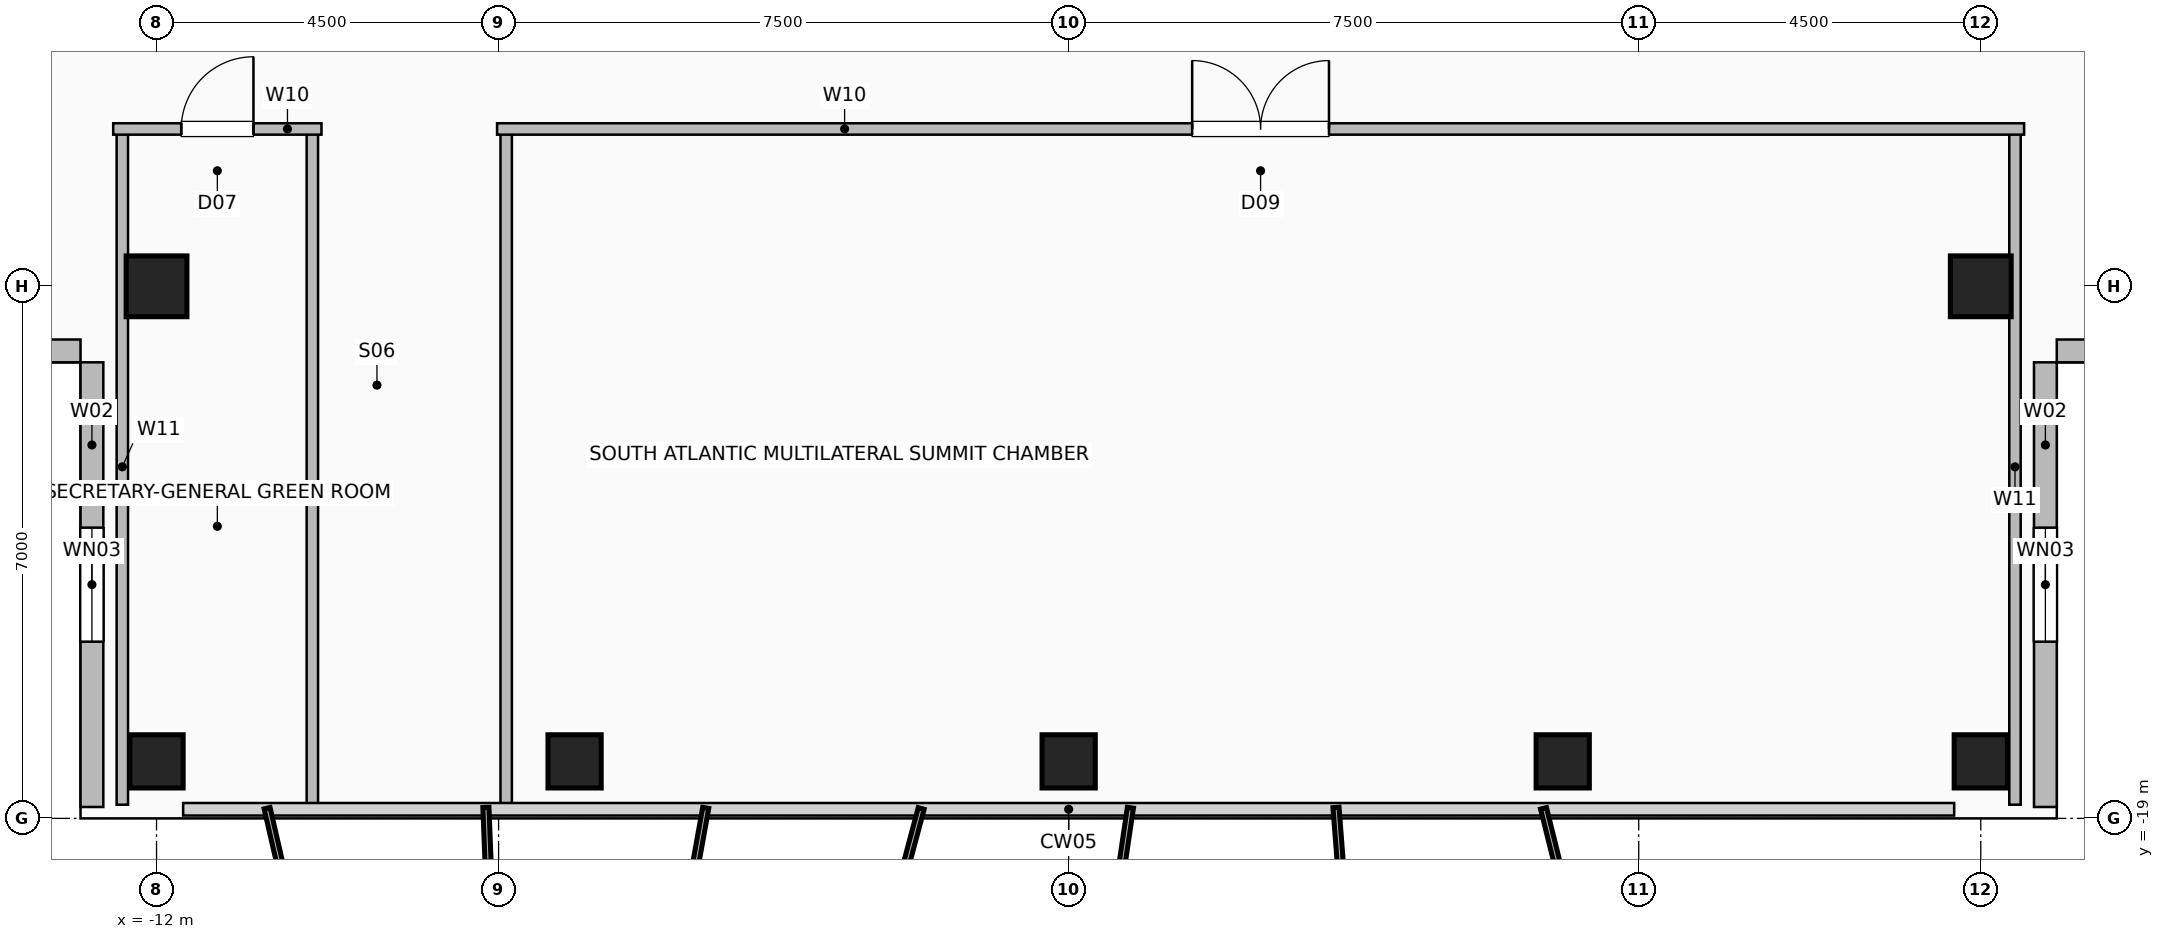
"""IFC4 building model, lengths in metres.
Left out: names, types, materials, properties, quantities, classifications, styles, units other than length and angle.
Written with IfcOpenShell. Run it as: python <this file> out.ifc"""

import sys

from ifc_helpers import new_model, si_unit, direction, frame, frame_2d, origin, origin_2d, place, context, subcontext, project, spatial, rectangle, hollow_rectangle, extrude, element, fill, save


model = new_model("IFC4")
c1 = context("Model", 3, precision=1e-05, world=origin(), true_north=direction((0.0, 1.0)))
c2 = subcontext(c1, "Body", "Model", "MODEL_VIEW")
j1 = project(units=[si_unit("LENGTHUNIT", "METRE"), si_unit("PLANEANGLEUNIT", "RADIAN")], contexts=[c1])
p1 = place(None, origin())
s1 = spatial("IfcSite", under=j1, at=p1, CompositionType="ELEMENT")
p2 = place(p1, origin())
s2 = spatial("IfcBuilding", under=s1, at=p2, CompositionType="ELEMENT")
p3 = place(p2, frame((0.0, 0.0, 250.4)))
s3 = spatial("IfcBuildingStorey", under=s2, at=p3, CompositionType="ELEMENT", Elevation=250.4)
for number, where, z_axis, x_axis in (
    (1, (-12.0, -18.25, 0.0), (0.0, 0.0, 1.0), (1.0, 0.0, 0.0)),
    (2, (-6.5, -18.25, 0.0), (0.0, 0.0, 1.0), (1.0, 0.0, 0.0)),
    (3, (0.0, -18.25, 0.0), (0.0, 0.0, 1.0), (1.0, 0.0, 0.0)),
    (4, (6.5, -18.25, 0.0), (0.0, 0.0, 1.0), (1.0, 0.0, 0.0)),
    (5, (12.0, -18.25, 0.0), (0.0, 0.0, 1.0), (1.0, 0.0, 0.0)),
):
    element("IfcColumn", number, at=place(p3, frame(where, z_axis=z_axis, x_axis=x_axis)), inside=s3, PredefinedType="COLUMN", context=c2, shape_type="SweptSolid", body=[
        extrude(hollow_rectangle(XDim=0.7, YDim=0.7, WallThickness=0.035, at=origin_2d()), origin(), (0.0, 0.0, 1.0), 3.6),
    ])
for number, where, z_axis, x_axis in (
    (6, (-12.0, -12.0, 0.0), (0.0, 0.0, 1.0), (1.0, 0.0, 0.0)),
    (7, (12.0, -12.0, 0.0), (0.0, 0.0, 1.0), (1.0, 0.0, 0.0)),
):
    element("IfcColumn", number, at=place(p3, frame(where, z_axis=z_axis, x_axis=x_axis)), inside=s3, PredefinedType="COLUMN", context=c2, shape_type="SweptSolid", body=[
        extrude(hollow_rectangle(XDim=0.8, YDim=0.8, WallThickness=0.04, at=origin_2d()), origin(), (0.0, 0.0, 1.0), 3.6),
    ])
p4 = place(p3, frame((-12.85, -18.85, 0.0), z_axis=(0.0, 0.0, 1.0), x_axis=(0.0, 1.0, 0.0)))
e8 = element("IfcWall", 8, at=p4, inside=s3, PredefinedType="SOLIDWALL", context=c2, shape_type="SweptSolid", body=[
    extrude(rectangle(XDim=5.85, YDim=0.3, at=frame_2d((2.925, 0.0))), origin(), (0.0, 0.0, 1.0), 3.36),
])
p5 = place(p4, frame((2.175, 0.0, 0.9)))
e9 = element("IfcOpeningElement", 9, at=p5, cuts=e8, PredefinedType="OPENING", context=c2, shape_type="SweptSolid", body=[
    extrude(rectangle(XDim=1.5, YDim=1.8, at=frame_2d((0.75, 0.9))), frame((0.0, 0.16, 0.0), z_axis=(0.0, -1.0, 0.0), x_axis=(1.0, 0.0, 0.0)), (0.0, 0.0, 1.0), 0.32),
])
p6 = place(p3, frame((-18.85, -12.85, 0.0), z_axis=(0.0, 0.0, 1.0), x_axis=(1.0, 0.0, 0.0)))
e10 = element("IfcWall", 10, at=p6, inside=s3, PredefinedType="SOLIDWALL", context=c2, shape_type="SweptSolid", body=[
    extrude(rectangle(XDim=5.85, YDim=0.3, at=frame_2d((2.925, 0.0))), origin(), (0.0, 0.0, 1.0), 3.36),
])
p7 = place(p3, frame((12.85, -18.85, 0.0), z_axis=(0.0, 0.0, 1.0), x_axis=(0.0, 1.0, 0.0)))
e11 = element("IfcWall", 11, at=p7, inside=s3, PredefinedType="SOLIDWALL", context=c2, shape_type="SweptSolid", body=[
    extrude(rectangle(XDim=5.85, YDim=0.3, at=frame_2d((2.925, 0.0))), origin(), (0.0, 0.0, 1.0), 3.36),
])
p8 = place(p7, frame((2.175, 0.0, 0.9)))
e12 = element("IfcOpeningElement", 12, at=p8, cuts=e11, PredefinedType="OPENING", context=c2, shape_type="SweptSolid", body=[
    extrude(rectangle(XDim=1.5, YDim=1.8, at=frame_2d((0.75, 0.9))), frame((0.0, 0.16, 0.0), z_axis=(0.0, -1.0, 0.0), x_axis=(1.0, 0.0, 0.0)), (0.0, 0.0, 1.0), 0.32),
])
p9 = place(p3, frame((18.85, -12.85, 0.0), z_axis=(0.0, 0.0, 1.0), x_axis=(-1.0, 0.0, 0.0)))
e13 = element("IfcWall", 13, at=p9, inside=s3, PredefinedType="SOLIDWALL", context=c2, shape_type="SweptSolid", body=[
    extrude(rectangle(XDim=5.85, YDim=0.3, at=frame_2d((2.925, 0.0))), origin(), (0.0, 0.0, 1.0), 3.36),
])
for number, where, z_axis, x_axis in (
    (14, (-12.45, -18.82, 0.0), (0.0, 0.0, 1.0), (0.0, 1.0, 0.0)),
    (15, (-9.95, -18.82, 0.0), (0.0, 0.0, 1.0), (0.0, 1.0, 0.0)),
):
    element("IfcWall", number, at=place(p3, frame(where, z_axis=z_axis, x_axis=x_axis)), inside=s3, PredefinedType="PARTITIONING", context=c2, shape_type="SweptSolid", body=[
        extrude(rectangle(XDim=8.89, YDim=0.15, at=frame_2d((4.445, 0.0))), origin(), (0.0, 0.0, 1.0), 3.36),
    ])
p10 = place(p3, frame((-12.57, -9.93, 0.0), z_axis=(0.0, 0.0, 1.0), x_axis=(1.0, 0.0, 0.0)))
e16 = element("IfcWall", 16, at=p10, inside=s3, PredefinedType="PARTITIONING", context=c2, shape_type="SweptSolid", body=[
    extrude(rectangle(XDim=2.74, YDim=0.15, at=frame_2d((1.37, 0.0))), origin(), (0.0, 0.0, 1.0), 3.36),
])
p11 = place(p10, frame((0.895, 0.0, 0.0)))
e17 = element("IfcOpeningElement", 17, at=p11, cuts=e16, PredefinedType="OPENING", context=c2, shape_type="SweptSolid", body=[
    extrude(rectangle(XDim=0.95, YDim=2.06, at=frame_2d((0.475, 1.03))), frame((0.0, 0.085, 0.0), z_axis=(0.0, -1.0, 0.0), x_axis=(1.0, 0.0, 0.0)), (0.0, 0.0, 1.0), 0.17),
])
for number, where, z_axis, x_axis in (
    (18, (-7.4, -18.82, 0.0), (0.0, 0.0, 1.0), (0.0, 1.0, 0.0)),
    (19, (12.45, -18.82, 0.0), (0.0, 0.0, 1.0), (0.0, 1.0, 0.0)),
):
    element("IfcWall", number, at=place(p3, frame(where, z_axis=z_axis, x_axis=x_axis)), inside=s3, PredefinedType="PARTITIONING", context=c2, shape_type="SweptSolid", body=[
        extrude(rectangle(XDim=8.89, YDim=0.15, at=frame_2d((4.445, 0.0))), origin(), (0.0, 0.0, 1.0), 3.36),
    ])
p12 = place(p3, frame((-7.52, -9.93, 0.0), z_axis=(0.0, 0.0, 1.0), x_axis=(1.0, 0.0, 0.0)))
e20 = element("IfcWall", 20, at=p12, inside=s3, PredefinedType="PARTITIONING", context=c2, shape_type="SweptSolid", body=[
    extrude(rectangle(XDim=20.09, YDim=0.15, at=frame_2d((10.045, 0.0))), origin(), (0.0, 0.0, 1.0), 3.36),
])
p13 = place(p12, frame((9.145, 0.0, 0.0)))
e21 = element("IfcOpeningElement", 21, at=p13, cuts=e20, PredefinedType="OPENING", context=c2, shape_type="SweptSolid", body=[
    extrude(rectangle(XDim=1.8, YDim=2.08, at=frame_2d((0.9, 1.04))), frame((0.0, 0.085, 0.0), z_axis=(0.0, -1.0, 0.0), x_axis=(1.0, 0.0, 0.0)), (0.0, 0.0, 1.0), 0.17),
])
p14 = place(p5, origin())
e22 = element("IfcWindow", 22, at=p14, inside=s3, PartitioningType="SINGLE_PANEL", PredefinedType="WINDOW", context=c2, shape_type="SweptSolid", body=[
    extrude(rectangle(XDim=1.5, YDim=1.8, at=frame_2d((0.75, 0.9))), frame((0.0, 0.03, 0.0), z_axis=(0.0, -1.0, 0.0), x_axis=(1.0, 0.0, 0.0)), (0.0, 0.0, 1.0), 0.06),
])
fill(e9, e22)
p15 = place(p8, origin())
e23 = element("IfcWindow", 23, at=p15, inside=s3, PartitioningType="SINGLE_PANEL", PredefinedType="WINDOW", context=c2, shape_type="SweptSolid", body=[
    extrude(rectangle(XDim=1.5, YDim=1.8, at=frame_2d((0.75, 0.9))), frame((0.0, 0.03, 0.0), z_axis=(0.0, -1.0, 0.0), x_axis=(1.0, 0.0, 0.0)), (0.0, 0.0, 1.0), 0.06),
])
fill(e12, e23)
p16 = place(p11, origin())
e24 = element("IfcDoor", 24, at=p16, inside=s3, OperationType="SINGLE_SWING_RIGHT", PredefinedType="DOOR", context=c2, shape_type="SweptSolid", body=[
    extrude(rectangle(XDim=0.95, YDim=2.06, at=frame_2d((0.475, 1.03))), frame((0.0, 0.025, 0.0), z_axis=(0.0, -1.0, 0.0), x_axis=(1.0, 0.0, 0.0)), (0.0, 0.0, 1.0), 0.05),
])
fill(e17, e24)
p17 = place(p13, origin())
e25 = element("IfcDoor", 25, at=p17, inside=s3, OperationType="DOUBLE_DOOR_SINGLE_SWING", PredefinedType="DOOR", context=c2, shape_type="SweptSolid", body=[
    extrude(rectangle(XDim=1.8, YDim=2.08, at=frame_2d((0.9, 1.04))), frame((0.0, 0.025, 0.0), z_axis=(0.0, -1.0, 0.0), x_axis=(1.0, 0.0, 0.0)), (0.0, 0.0, 1.0), 0.05),
])
fill(e21, e25)
save(model, sys.argv[1])
